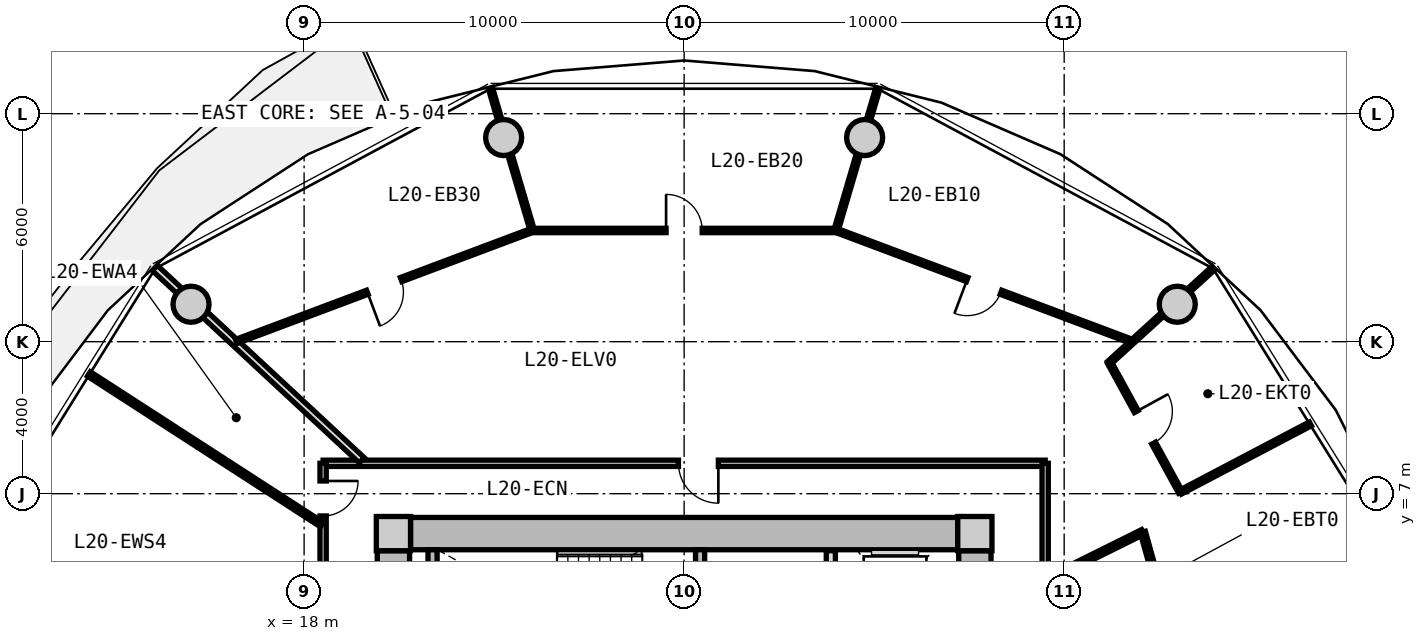
"""IFC4 building model, lengths in metres.
Left out: names, types, materials, properties, quantities, classifications, styles, units other than length and angle.
Written with IfcOpenShell. Run it as: python <this file> out.ifc"""

import sys

from ifc_helpers import new_model, si_unit, direction, frame, frame_2d, origin, origin_2d, place, context, subcontext, project, spatial, rectangle, circle, extrude, source, transform, mapped, element, fill, save


model = new_model("IFC4")
c1 = context("Model", 3, precision=1e-05, world=origin(), true_north=direction((0.0, 1.0)))
c2 = subcontext(c1, "Body", "Model", "MODEL_VIEW")
j1 = project(units=[si_unit("LENGTHUNIT", "METRE"), si_unit("PLANEANGLEUNIT", "RADIAN")], contexts=[c1])
p1 = place(None, origin())
s1 = spatial("IfcSite", under=j1, at=p1, CompositionType="ELEMENT")
p2 = place(p1, origin())
s2 = spatial("IfcBuilding", under=s1, at=p2, CompositionType="ELEMENT")
p3 = place(p2, frame((0.0, 0.0, 67.35)))
s3 = spatial("IfcBuildingStorey", under=s2, at=p3, CompositionType="ELEMENT", Elevation=67.35)
m1 = source(origin(), c2, "Body", "SweptSolid", [
    extrude(rectangle(XDim=0.9, YDim=0.9, at=origin_2d()), origin(), (0.0, 0.0, 1.0), 3.05),
])
for number, where, z_axis, x_axis in (
    (1, (35.65, 5.95, 0.0), (0.0, 0.0, 1.0), (1.0, 0.0, 0.0)),
    (2, (20.35, 5.95, 0.0), (0.0, 0.0, 1.0), (1.0, 0.0, 0.0)),
):
    element("IfcColumn", number, at=place(p3, frame(where, z_axis=z_axis, x_axis=x_axis)), inside=s3, PredefinedType="COLUMN", context=c2, shape_type="MappedRepresentation", body=[
        mapped(m1, transform((0.0, 0.0, 0.0), x_axis=(1.0, 0.0, 0.0), y_axis=(0.0, 1.0, 0.0), z_axis=(0.0, 0.0, 1.0), scale=1.0)),
    ])
m2 = source(origin(), c2, "Body", "SweptSolid", [
    extrude(rectangle(XDim=14.4, YDim=0.85, at=frame_2d((7.2, 0.0))), origin(), (0.0, 0.0, 1.0), 2.79),
])
p4 = place(p3, frame((20.8, 5.95, 0.0), z_axis=(0.0, 0.0, 1.0), x_axis=(1.0, 0.0, 0.0)))
e3 = element("IfcWall", 3, at=p4, inside=s3, PredefinedType="SHEAR", context=c2, shape_type="MappedRepresentation", body=[
    mapped(m2, transform((0.0, 0.0, 0.0), x_axis=(1.0, 0.0, 0.0), y_axis=(0.0, 1.0, 0.0), z_axis=(0.0, 0.0, 1.0), scale=1.0)),
])
m3 = source(origin(), c2, "Body", "SweptSolid", [
    extrude(rectangle(XDim=11.0, YDim=0.85, at=frame_2d((5.5, 0.0))), origin(), (0.0, 0.0, 1.0), 2.79),
])
p5 = place(p3, frame((20.35, -5.5, 0.0), z_axis=(0.0, 0.0, 1.0), x_axis=(0.0, 1.0, 0.0)))
e4 = element("IfcWall", 4, at=p5, inside=s3, PredefinedType="SHEAR", context=c2, shape_type="MappedRepresentation", body=[
    mapped(m3, transform((0.0, 0.0, 0.0), x_axis=(1.0, 0.0, 0.0), y_axis=(0.0, 1.0, 0.0), z_axis=(0.0, 0.0, 1.0), scale=1.0)),
])
p6 = place(p5, frame((3.8, 0.0, 0.0)))
e5 = element("IfcOpeningElement", 5, at=p6, cuts=e4, PredefinedType="OPENING", context=c2, shape_type="SweptSolid", body=[
    extrude(rectangle(XDim=1.2, YDim=2.15, at=frame_2d((0.6, 1.075))), frame((0.0, 0.435, 0.0), z_axis=(0.0, -1.0, 0.0), x_axis=(1.0, 0.0, 0.0)), (0.0, 0.0, 1.0), 0.87),
])
p7 = place(p3, frame((35.65, 5.5, 0.0), z_axis=(0.0, 0.0, 1.0), x_axis=(0.0, -1.0, 0.0)))
e6 = element("IfcWall", 6, at=p7, inside=s3, PredefinedType="SHEAR", context=c2, shape_type="MappedRepresentation", body=[
    mapped(m3, transform((0.0, 0.0, 0.0), x_axis=(1.0, 0.0, 0.0), y_axis=(0.0, 1.0, 0.0), z_axis=(0.0, 0.0, 1.0), scale=1.0)),
])
p8 = place(p7, frame((5.65, 0.0, 0.0)))
e7 = element("IfcOpeningElement", 7, at=p8, cuts=e6, PredefinedType="OPENING", context=c2, shape_type="SweptSolid", body=[
    extrude(rectangle(XDim=1.2, YDim=2.15, at=frame_2d((0.6, 1.075))), frame((0.0, 0.435, 0.0), z_axis=(0.0, -1.0, 0.0), x_axis=(1.0, 0.0, 0.0)), (0.0, 0.0, 1.0), 0.87),
])
m4 = source(origin(), c2, "Body", "SweptSolid", [
    extrude(circle(Radius=0.475, at=origin_2d()), origin(), (0.0, 0.0, 1.0), 3.05),
])
for number, where, z_axis, x_axis in (
    (8, (40.975, 11.985, 0.0), (0.0, 0.0, 1.0), (1.0, 0.0, 0.0)),
    (9, (32.749, 16.373, 0.0), (0.0, 0.0, 1.0), (1.0, 0.0, 0.0)),
    (10, (23.251, 16.373, 0.0), (0.0, 0.0, 1.0), (1.0, 0.0, 0.0)),
    (11, (15.025, 11.985, 0.0), (0.0, 0.0, 1.0), (1.0, 0.0, 0.0)),
):
    element("IfcColumn", number, at=place(p3, frame(where, z_axis=z_axis, x_axis=x_axis)), inside=s3, PredefinedType="COLUMN", context=c2, shape_type="MappedRepresentation", body=[
        mapped(m4, transform((0.0, 0.0, 0.0), x_axis=(1.0, 0.0, 0.0), y_axis=(0.0, 1.0, 0.0), z_axis=(0.0, 0.0, 1.0), scale=1.0)),
    ])
m5 = source(origin(), c2, "Body", "SweptSolid", [
    extrude(rectangle(XDim=3.075, YDim=0.24, at=frame_2d((1.538, 0.0))), origin(), (0.0, 0.0, 1.0), 2.79),
])
p9 = place(p3, frame((21.38, 2.45, 0.0), z_axis=(0.0, 0.0, 1.0), x_axis=(0.0, 1.0, 0.0)))
e12 = element("IfcWall", 12, at=p9, inside=s3, PredefinedType="PARTITIONING", context=c2, shape_type="MappedRepresentation", body=[
    mapped(m5, transform((0.0, 0.0, 0.0), x_axis=(1.0, 0.0, 0.0), y_axis=(0.0, 1.0, 0.0), z_axis=(0.0, 0.0, 1.0), scale=1.0)),
])
p10 = place(p3, frame((28.42, 2.45, 0.0), z_axis=(0.0, 0.0, 1.0), x_axis=(0.0, 1.0, 0.0)))
e13 = element("IfcWall", 13, at=p10, inside=s3, PredefinedType="PARTITIONING", context=c2, shape_type="MappedRepresentation", body=[
    mapped(m5, transform((0.0, 0.0, 0.0), x_axis=(1.0, 0.0, 0.0), y_axis=(0.0, 1.0, 0.0), z_axis=(0.0, 0.0, 1.0), scale=1.0)),
])
p11 = place(p10, frame((0.55, 0.0, 0.0)))
e14 = element("IfcOpeningElement", 14, at=p11, cuts=e13, PredefinedType="OPENING", context=c2, shape_type="SweptSolid", body=[
    extrude(rectangle(XDim=1.1, YDim=2.15, at=frame_2d((0.55, 1.075))), frame((0.0, 0.13, 0.0), z_axis=(0.0, -1.0, 0.0), x_axis=(1.0, 0.0, 0.0)), (0.0, 0.0, 1.0), 0.26),
])
m6 = source(origin(), c2, "Body", "SweptSolid", [
    extrude(rectangle(XDim=5.0, YDim=0.24, at=frame_2d((2.5, 0.0))), origin(), (0.0, 0.0, 1.0), 2.775),
])
p12 = place(p3, frame((31.86, 0.5, 0.0), z_axis=(0.0, 0.0, 1.0), x_axis=(0.0, 1.0, 0.0)))
e15 = element("IfcWall", 15, at=p12, inside=s3, PredefinedType="PARTITIONING", context=c2, shape_type="MappedRepresentation", body=[
    mapped(m6, transform((0.0, 0.0, 0.0), x_axis=(1.0, 0.0, 0.0), y_axis=(0.0, 1.0, 0.0), z_axis=(0.0, 0.0, 1.0), scale=1.0)),
])
p13 = place(p12, frame((3.05, 0.0, 0.0)))
e16 = element("IfcOpeningElement", 16, at=p13, cuts=e15, PredefinedType="OPENING", context=c2, shape_type="SweptSolid", body=[
    extrude(rectangle(XDim=1.3, YDim=2.2, at=frame_2d((0.65, 1.1))), frame((0.0, 0.13, 0.0), z_axis=(0.0, -1.0, 0.0), x_axis=(1.0, 0.0, 0.0)), (0.0, 0.0, 1.0), 0.26),
])
p14 = place(p12, frame((0.55, 0.0, 0.0)))
e17 = element("IfcOpeningElement", 17, at=p14, cuts=e15, PredefinedType="OPENING", context=c2, shape_type="SweptSolid", body=[
    extrude(rectangle(XDim=1.3, YDim=2.2, at=frame_2d((0.65, 1.1))), frame((0.0, 0.13, 0.0), z_axis=(0.0, -1.0, 0.0), x_axis=(1.0, 0.0, 0.0)), (0.0, 0.0, 1.0), 0.26),
])
m7 = source(origin(), c2, "Body", "SweptSolid", [
    extrude(rectangle(XDim=19.0, YDim=0.165, at=frame_2d((9.5, 0.0))), origin(), (0.0, 0.0, 1.0), 2.775),
])
p15 = place(p3, frame((18.5, 7.8, 0.0), z_axis=(0.0, 0.0, 1.0), x_axis=(1.0, 0.0, 0.0)))
e18 = element("IfcWall", 18, at=p15, inside=s3, PredefinedType="PARTITIONING", context=c2, shape_type="MappedRepresentation", body=[
    mapped(m7, transform((0.0, 0.0, 0.0), x_axis=(1.0, 0.0, 0.0), y_axis=(0.0, 1.0, 0.0), z_axis=(0.0, 0.0, 1.0), scale=1.0)),
])
p16 = place(p15, frame((9.35, 0.0, 0.0)))
e19 = element("IfcOpeningElement", 19, at=p16, cuts=e18, PredefinedType="OPENING", context=c2, shape_type="SweptSolid", body=[
    extrude(rectangle(XDim=1.05, YDim=2.15, at=frame_2d((0.525, 1.075))), frame((0.0, 0.093, 0.0), z_axis=(0.0, -1.0, 0.0), x_axis=(1.0, 0.0, 0.0)), (0.0, 0.0, 1.0), 0.185),
])
m8 = source(origin(), c2, "Body", "SweptSolid", [
    extrude(rectangle(XDim=15.6, YDim=0.165, at=frame_2d((7.8, 0.0))), origin(), (0.0, 0.0, 1.0), 2.775),
])
p17 = place(p3, frame((18.5, -7.8, 0.0), z_axis=(0.0, 0.0, 1.0), x_axis=(0.0, 1.0, 0.0)))
e20 = element("IfcWall", 20, at=p17, inside=s3, PredefinedType="PARTITIONING", context=c2, shape_type="MappedRepresentation", body=[
    mapped(m8, transform((0.0, 0.0, 0.0), x_axis=(1.0, 0.0, 0.0), y_axis=(0.0, 1.0, 0.0), z_axis=(0.0, 0.0, 1.0), scale=1.0)),
])
p18 = place(p17, frame((14.215, 0.0, 0.0)))
e21 = element("IfcOpeningElement", 21, at=p18, cuts=e20, PredefinedType="OPENING", context=c2, shape_type="SweptSolid", body=[
    extrude(rectangle(XDim=0.92, YDim=2.1, at=frame_2d((0.46, 1.05))), frame((0.0, 0.093, 0.0), z_axis=(0.0, -1.0, 0.0), x_axis=(1.0, 0.0, 0.0)), (0.0, 0.0, 1.0), 0.185),
])
p19 = place(p17, frame((11.609, 0.0, 0.0)))
e22 = element("IfcOpeningElement", 22, at=p19, cuts=e20, PredefinedType="OPENING", context=c2, shape_type="SweptSolid", body=[
    extrude(rectangle(XDim=0.92, YDim=2.1, at=frame_2d((0.46, 1.05))), frame((0.0, 0.093, 0.0), z_axis=(0.0, -1.0, 0.0), x_axis=(1.0, 0.0, 0.0)), (0.0, 0.0, 1.0), 0.185),
])
p20 = place(p17, frame((7.175, 0.0, 0.0)))
e23 = element("IfcOpeningElement", 23, at=p20, cuts=e20, PredefinedType="OPENING", context=c2, shape_type="SweptSolid", body=[
    extrude(rectangle(XDim=1.25, YDim=2.2, at=frame_2d((0.625, 1.1))), frame((0.0, 0.093, 0.0), z_axis=(0.0, -1.0, 0.0), x_axis=(1.0, 0.0, 0.0)), (0.0, 0.0, 1.0), 0.185),
])
p21 = place(p3, frame((37.5, 7.8, 0.0), z_axis=(0.0, 0.0, 1.0), x_axis=(0.0, -1.0, 0.0)))
e24 = element("IfcWall", 24, at=p21, inside=s3, PredefinedType="PARTITIONING", context=c2, shape_type="MappedRepresentation", body=[
    mapped(m8, transform((0.0, 0.0, 0.0), x_axis=(1.0, 0.0, 0.0), y_axis=(0.0, 1.0, 0.0), z_axis=(0.0, 0.0, 1.0), scale=1.0)),
])
p22 = place(p21, frame((8.835, 0.0, 0.0)))
e25 = element("IfcOpeningElement", 25, at=p22, cuts=e24, PredefinedType="OPENING", context=c2, shape_type="SweptSolid", body=[
    extrude(rectangle(XDim=1.05, YDim=2.15, at=frame_2d((0.525, 1.075))), frame((0.0, 0.093, 0.0), z_axis=(0.0, -1.0, 0.0), x_axis=(1.0, 0.0, 0.0)), (0.0, 0.0, 1.0), 0.185),
])
m9 = source(origin(), c2, "Body", "SweptSolid", [
    extrude(rectangle(XDim=7.435, YDim=0.19, at=frame_2d((3.717, 0.0))), origin(), (0.0, 0.0, 1.0), 2.225),
])
p23 = place(p3, frame((19.517, 7.88, 0.0), z_axis=(0.0, 0.0, 1.0), x_axis=(-0.732651956848, 0.680603489652, 0.0)))
e26 = element("IfcWall", 26, at=p23, inside=s3, PredefinedType="PARTITIONING", context=c2, shape_type="MappedRepresentation", body=[
    mapped(m9, transform((0.0, 0.0, 0.0), x_axis=(1.0, 0.0, 0.0), y_axis=(0.0, 1.0, 0.0), z_axis=(0.0, 0.0, 1.0), scale=1.0)),
])
m10 = source(origin(), c2, "Body", "SweptSolid", [
    extrude(rectangle(XDim=8.32, YDim=0.115, at=frame_2d((4.16, 0.0))), origin(), (0.0, 0.0, 1.0), 2.775),
])
p24 = place(p3, frame((39.786, 11.006, 0.0), z_axis=(0.0, 0.0, 1.0), x_axis=(-0.936180763098, 0.351518959382, 0.0)))
e27 = element("IfcWall", 27, at=p24, inside=s3, PredefinedType="PARTITIONING", context=c2, shape_type="MappedRepresentation", body=[
    mapped(m10, transform((0.0, 0.0, 0.0), x_axis=(1.0, 0.0, 0.0), y_axis=(0.0, 1.0, 0.0), z_axis=(0.0, 0.0, 1.0), scale=1.0)),
])
p25 = place(p24, frame((3.685, 0.0, 0.0)))
e28 = element("IfcOpeningElement", 28, at=p25, cuts=e27, PredefinedType="OPENING", context=c2, shape_type="SweptSolid", body=[
    extrude(rectangle(XDim=0.95, YDim=2.1, at=frame_2d((0.475, 1.05))), frame((0.0, 0.067, 0.0), z_axis=(0.0, -1.0, 0.0), x_axis=(1.0, 0.0, 0.0)), (0.0, 0.0, 1.0), 0.135),
])
m11 = source(origin(), c2, "Body", "SweptSolid", [
    extrude(rectangle(XDim=3.713, YDim=0.115, at=frame_2d((1.856, 0.0))), origin(), (0.0, 0.0, 1.0), 2.225),
])
p26 = place(p3, frame((39.183, 10.442, 0.0), z_axis=(0.0, 0.0, 1.0), x_axis=(0.739877587881, 0.67274152165, 0.0)))
e29 = element("IfcWall", 29, at=p26, inside=s3, PredefinedType="PARTITIONING", context=c2, shape_type="MappedRepresentation", body=[
    mapped(m11, transform((0.0, 0.0, 0.0), x_axis=(1.0, 0.0, 0.0), y_axis=(0.0, 1.0, 0.0), z_axis=(0.0, 0.0, 1.0), scale=1.0)),
])
m12 = source(origin(), c2, "Body", "SweptSolid", [
    extrude(rectangle(XDim=7.993, YDim=0.115, at=frame_2d((3.996, 0.0))), origin(), (0.0, 0.0, 1.0), 2.775),
])
p27 = place(p3, frame((31.996, 13.927, 0.0), z_axis=(0.0, 0.0, 1.0), x_axis=(-1.0, 0.0, 0.0)))
e30 = element("IfcWall", 30, at=p27, inside=s3, PredefinedType="PARTITIONING", context=c2, shape_type="MappedRepresentation", body=[
    mapped(m12, transform((0.0, 0.0, 0.0), x_axis=(1.0, 0.0, 0.0), y_axis=(0.0, 1.0, 0.0), z_axis=(0.0, 0.0, 1.0), scale=1.0)),
])
p28 = place(p27, frame((3.521, 0.0, 0.0)))
e31 = element("IfcOpeningElement", 31, at=p28, cuts=e30, PredefinedType="OPENING", context=c2, shape_type="SweptSolid", body=[
    extrude(rectangle(XDim=0.95, YDim=2.1, at=frame_2d((0.475, 1.05))), frame((0.0, 0.067, 0.0), z_axis=(0.0, -1.0, 0.0), x_axis=(1.0, 0.0, 0.0)), (0.0, 0.0, 1.0), 0.135),
])
m13 = source(origin(), c2, "Body", "SweptSolid", [
    extrude(rectangle(XDim=3.908, YDim=0.115, at=frame_2d((1.954, 0.0))), origin(), (0.0, 0.0, 1.0), 2.225),
])
p29 = place(p3, frame((31.996, 13.927, 0.0), z_axis=(0.0, 0.0, 1.0), x_axis=(0.282047948883, 0.959400309845, 0.0)))
e32 = element("IfcWall", 32, at=p29, inside=s3, PredefinedType="PARTITIONING", context=c2, shape_type="MappedRepresentation", body=[
    mapped(m13, transform((0.0, 0.0, 0.0), x_axis=(1.0, 0.0, 0.0), y_axis=(0.0, 1.0, 0.0), z_axis=(0.0, 0.0, 1.0), scale=1.0)),
])
p30 = place(p3, frame((24.003, 13.93, 0.0), z_axis=(0.0, 0.0, 1.0), x_axis=(-0.936180763098, -0.351518959382, 0.0)))
e33 = element("IfcWall", 33, at=p30, inside=s3, PredefinedType="PARTITIONING", context=c2, shape_type="MappedRepresentation", body=[
    mapped(m10, transform((0.0, 0.0, 0.0), x_axis=(1.0, 0.0, 0.0), y_axis=(0.0, 1.0, 0.0), z_axis=(0.0, 0.0, 1.0), scale=1.0)),
])
p31 = place(p30, frame((3.685, 0.0, 0.0)))
e34 = element("IfcOpeningElement", 34, at=p31, cuts=e33, PredefinedType="OPENING", context=c2, shape_type="SweptSolid", body=[
    extrude(rectangle(XDim=0.95, YDim=2.1, at=frame_2d((0.475, 1.05))), frame((0.0, 0.067, 0.0), z_axis=(0.0, -1.0, 0.0), x_axis=(1.0, 0.0, 0.0)), (0.0, 0.0, 1.0), 0.135),
])
m14 = source(origin(), c2, "Body", "SweptSolid", [
    extrude(rectangle(XDim=3.905, YDim=0.115, at=frame_2d((1.952, 0.0))), origin(), (0.0, 0.0, 1.0), 2.225),
])
p32 = place(p3, frame((24.003, 13.93, 0.0), z_axis=(0.0, 0.0, 1.0), x_axis=(-0.282037692958, 0.959403324859, 0.0)))
e35 = element("IfcWall", 35, at=p32, inside=s3, PredefinedType="PARTITIONING", context=c2, shape_type="MappedRepresentation", body=[
    mapped(m14, transform((0.0, 0.0, 0.0), x_axis=(1.0, 0.0, 0.0), y_axis=(0.0, 1.0, 0.0), z_axis=(0.0, 0.0, 1.0), scale=1.0)),
])
m15 = source(origin(), c2, "Body", "SweptSolid", [
    extrude(rectangle(XDim=2.834, YDim=0.14, at=frame_2d((1.417, 0.0))), origin(), (0.0, 0.0, 1.0), 2.775),
])
p33 = place(p3, frame((37.53, 4.732, 0.0), z_axis=(0.0, 0.0, 1.0), x_axis=(0.895681174462, 0.444696788513, 0.0)))
e36 = element("IfcWall", 36, at=p33, inside=s3, PredefinedType="PARTITIONING", context=c2, shape_type="MappedRepresentation", body=[
    mapped(m15, transform((0.0, 0.0, 0.0), x_axis=(1.0, 0.0, 0.0), y_axis=(0.0, 1.0, 0.0), z_axis=(0.0, 0.0, 1.0), scale=1.0)),
])
m16 = source(origin(), c2, "Body", "SweptSolid", [
    extrude(rectangle(XDim=2.885, YDim=0.14, at=frame_2d((1.442, 0.0))), origin(), (0.0, 0.0, 1.0), 2.775),
])
p34 = place(p3, frame((40.069, 5.992, 0.0), z_axis=(0.0, 0.0, 1.0), x_axis=(0.269799431837, -0.962916541856, 0.0)))
e37 = element("IfcWall", 37, at=p34, inside=s3, PredefinedType="PARTITIONING", context=c2, shape_type="MappedRepresentation", body=[
    mapped(m16, transform((0.0, 0.0, 0.0), x_axis=(1.0, 0.0, 0.0), y_axis=(0.0, 1.0, 0.0), z_axis=(0.0, 0.0, 1.0), scale=1.0)),
])
p35 = place(p34, frame((0.982, 0.0, 0.0)))
e38 = element("IfcOpeningElement", 38, at=p35, cuts=e37, PredefinedType="OPENING", context=c2, shape_type="SweptSolid", body=[
    extrude(rectangle(XDim=0.92, YDim=2.1, at=frame_2d((0.46, 1.05))), frame((0.0, 0.08, 0.0), z_axis=(0.0, -1.0, 0.0), x_axis=(1.0, 0.0, 0.0)), (0.0, 0.0, 1.0), 0.16),
])
m17 = source(origin(), c2, "Body", "SweptSolid", [
    extrude(rectangle(XDim=3.864, YDim=0.115, at=frame_2d((1.932, 0.0))), origin(), (0.0, 0.0, 1.0), 2.775),
])
p36 = place(p3, frame((41.06, 7.041, 0.0), z_axis=(0.0, 0.0, 1.0), x_axis=(0.885194959803, 0.465220252289, 0.0)))
e39 = element("IfcWall", 39, at=p36, inside=s3, PredefinedType="PARTITIONING", context=c2, shape_type="MappedRepresentation", body=[
    mapped(m17, transform((0.0, 0.0, 0.0), x_axis=(1.0, 0.0, 0.0), y_axis=(0.0, 1.0, 0.0), z_axis=(0.0, 0.0, 1.0), scale=1.0)),
])
m18 = source(origin(), c2, "Body", "SweptSolid", [
    extrude(rectangle(XDim=3.888, YDim=0.115, at=frame_2d((1.944, 0.0))), origin(), (0.0, 0.0, 1.0), 2.775),
])
p37 = place(p3, frame((41.06, 7.041, 0.0), z_axis=(0.0, 0.0, 1.0), x_axis=(-0.480382482853, 0.877059103007, 0.0)))
e40 = element("IfcWall", 40, at=p37, inside=s3, PredefinedType="PARTITIONING", context=c2, shape_type="MappedRepresentation", body=[
    mapped(m18, transform((0.0, 0.0, 0.0), x_axis=(1.0, 0.0, 0.0), y_axis=(0.0, 1.0, 0.0), z_axis=(0.0, 0.0, 1.0), scale=1.0)),
])
p38 = place(p37, frame((1.469, 0.0, 0.0)))
e41 = element("IfcOpeningElement", 41, at=p38, cuts=e40, PredefinedType="OPENING", context=c2, shape_type="SweptSolid", body=[
    extrude(rectangle(XDim=0.95, YDim=2.1, at=frame_2d((0.475, 1.05))), frame((0.0, 0.067, 0.0), z_axis=(0.0, -1.0, 0.0), x_axis=(1.0, 0.0, 0.0)), (0.0, 0.0, 1.0), 0.135),
])
m19 = source(origin(), c2, "Body", "SweptSolid", [
    extrude(rectangle(XDim=7.304, YDim=0.14, at=frame_2d((3.652, 0.0))), origin(), (0.0, 0.0, 1.0), 2.775),
])
p39 = place(p3, frame((18.47, 6.185, 0.0), z_axis=(0.0, 0.0, 1.0), x_axis=(-0.83973870965, 0.54299069929, 0.0)))
e42 = element("IfcWall", 42, at=p39, inside=s3, PredefinedType="PARTITIONING", context=c2, shape_type="MappedRepresentation", body=[
    mapped(m19, transform((0.0, 0.0, 0.0), x_axis=(1.0, 0.0, 0.0), y_axis=(0.0, 1.0, 0.0), z_axis=(0.0, 0.0, 1.0), scale=1.0)),
])
m20 = source(origin(), c2, "Body", "SweptSolid", [
    extrude(rectangle(XDim=1.05, YDim=2.15, at=frame_2d((0.525, 1.075))), frame((0.0, 0.025, 0.0), z_axis=(0.0, -1.0, 0.0), x_axis=(1.0, 0.0, 0.0)), (0.0, 0.0, 1.0), 0.05),
])
p40 = place(p16, frame((1.05, 0.0, 0.0), z_axis=(0.0, 0.0, 1.0), x_axis=(-1.0, 0.0, 0.0)))
e43 = element("IfcDoor", 43, at=p40, inside=s3, OperationType="SINGLE_SWING_LEFT", PredefinedType="DOOR", context=c2, shape_type="MappedRepresentation", body=[
    mapped(m20, transform((0.0, 0.0, 0.0), x_axis=(1.0, 0.0, 0.0), y_axis=(0.0, 1.0, 0.0), z_axis=(0.0, 0.0, 1.0), scale=1.0)),
])
fill(e19, e43)
m21 = source(origin(), c2, "Body", "SweptSolid", [
    extrude(rectangle(XDim=0.95, YDim=2.1, at=frame_2d((0.475, 1.05))), frame((0.0, 0.025, 0.0), z_axis=(0.0, -1.0, 0.0), x_axis=(1.0, 0.0, 0.0)), (0.0, 0.0, 1.0), 0.05),
])
p41 = place(p38, frame((0.95, 0.0, 0.0), z_axis=(0.0, 0.0, 1.0), x_axis=(-1.0, 0.0, 0.0)))
e44 = element("IfcDoor", 44, at=p41, inside=s3, OperationType="SINGLE_SWING_LEFT", PredefinedType="DOOR", context=c2, shape_type="MappedRepresentation", body=[
    mapped(m21, transform((0.0, 0.0, 0.0), x_axis=(1.0, 0.0, 0.0), y_axis=(0.0, 1.0, 0.0), z_axis=(0.0, 0.0, 1.0), scale=1.0)),
])
fill(e41, e44)
p42 = place(p25, origin())
e45 = element("IfcDoor", 45, at=p42, inside=s3, OperationType="SINGLE_SWING_RIGHT", PredefinedType="DOOR", context=c2, shape_type="MappedRepresentation", body=[
    mapped(m21, transform((0.0, 0.0, 0.0), x_axis=(1.0, 0.0, 0.0), y_axis=(0.0, 1.0, 0.0), z_axis=(0.0, 0.0, 1.0), scale=1.0)),
])
fill(e28, e45)
p43 = place(p28, frame((0.95, 0.0, 0.0), z_axis=(0.0, 0.0, 1.0), x_axis=(-1.0, 0.0, 0.0)))
e46 = element("IfcDoor", 46, at=p43, inside=s3, OperationType="SINGLE_SWING_LEFT", PredefinedType="DOOR", context=c2, shape_type="MappedRepresentation", body=[
    mapped(m21, transform((0.0, 0.0, 0.0), x_axis=(1.0, 0.0, 0.0), y_axis=(0.0, 1.0, 0.0), z_axis=(0.0, 0.0, 1.0), scale=1.0)),
])
fill(e31, e46)
p44 = place(p31, origin())
e47 = element("IfcDoor", 47, at=p44, inside=s3, OperationType="SINGLE_SWING_RIGHT", PredefinedType="DOOR", context=c2, shape_type="MappedRepresentation", body=[
    mapped(m21, transform((0.0, 0.0, 0.0), x_axis=(1.0, 0.0, 0.0), y_axis=(0.0, 1.0, 0.0), z_axis=(0.0, 0.0, 1.0), scale=1.0)),
])
fill(e34, e47)
m22 = source(origin(), c2, "Body", "SweptSolid", [
    extrude(rectangle(XDim=0.92, YDim=2.1, at=frame_2d((0.46, 1.05))), frame((0.0, 0.025, 0.0), z_axis=(0.0, -1.0, 0.0), x_axis=(1.0, 0.0, 0.0)), (0.0, 0.0, 1.0), 0.05),
])
p45 = place(p18, frame((0.92, 0.0, 0.0), z_axis=(0.0, 0.0, 1.0), x_axis=(-1.0, 0.0, 0.0)))
e48 = element("IfcDoor", 48, at=p45, inside=s3, OperationType="SINGLE_SWING_LEFT", PredefinedType="DOOR", context=c2, shape_type="MappedRepresentation", body=[
    mapped(m22, transform((0.0, 0.0, 0.0), x_axis=(1.0, 0.0, 0.0), y_axis=(0.0, 1.0, 0.0), z_axis=(0.0, 0.0, 1.0), scale=1.0)),
])
fill(e21, e48)
save(model, sys.argv[1])
